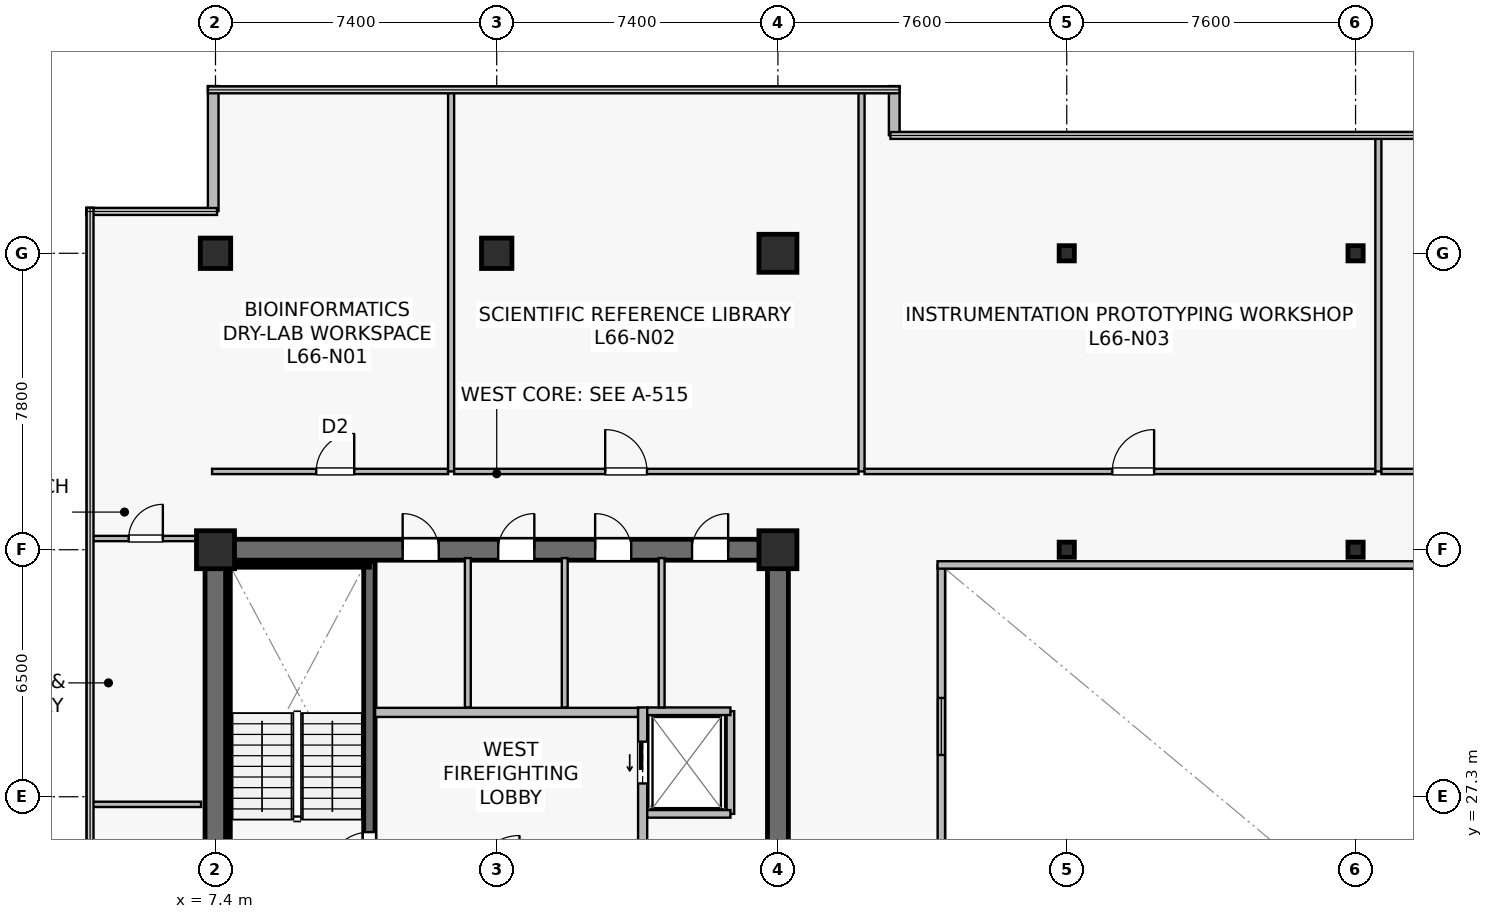
"""IFC4 building model, lengths in metres.
Left out: names, types, materials, properties, quantities, classifications, styles, units other than length and angle.
Written with IfcOpenShell. Run it as: python <this file> out.ifc"""

import sys

from ifc_helpers import new_model, si_unit, direction, frame, frame_2d, origin, origin_2d, place, context, subcontext, project, spatial, rectangle, hollow_rectangle, extrude, source, transform, mapped, element, fill, save


model = new_model("IFC4")
c1 = context("Model", 3, precision=1e-05, world=origin(), true_north=direction((0.0, 1.0)))
c2 = subcontext(c1, "Body", "Model", "MODEL_VIEW")
j1 = project(units=[si_unit("LENGTHUNIT", "METRE"), si_unit("PLANEANGLEUNIT", "RADIAN")], contexts=[c1])
p1 = place(None, origin())
s1 = spatial("IfcSite", under=j1, at=p1, CompositionType="ELEMENT")
p2 = place(p1, origin())
s2 = spatial("IfcBuilding", under=s1, at=p2, CompositionType="ELEMENT")
p3 = place(p2, frame((0.0, 0.0, 275.2)))
s3 = spatial("IfcBuildingStorey", under=s2, at=p3, CompositionType="ELEMENT", Elevation=275.2)
p4 = place(p3, frame((7.125, 33.8, 0.0), z_axis=(0.0, 0.0, 1.0), x_axis=(1.0, 0.0, 0.0)))
e1 = element("IfcWall", 1, at=p4, inside=s3, PredefinedType="SHEAR", context=c2, shape_type="SweptSolid", body=[
    extrude(rectangle(XDim=15.35, YDim=0.55, at=frame_2d((7.675, 0.0))), origin(), (0.0, 0.0, 1.0), 3.8),
])
p5 = place(p4, frame((5.2, 0.0, 0.0)))
e2 = element("IfcOpeningElement", 2, at=p5, cuts=e1, PredefinedType="OPENING", context=c2, shape_type="SweptSolid", body=[
    extrude(rectangle(XDim=0.95, YDim=2.15, at=frame_2d((0.475, 1.075))), frame((0.0, 0.285, 0.0), z_axis=(0.0, -1.0, 0.0), x_axis=(1.0, 0.0, 0.0)), (0.0, 0.0, 1.0), 0.57),
])
p6 = place(p4, frame((7.715, 0.0, 0.0)))
e3 = element("IfcOpeningElement", 3, at=p6, cuts=e1, PredefinedType="OPENING", context=c2, shape_type="SweptSolid", body=[
    extrude(rectangle(XDim=0.95, YDim=2.15, at=frame_2d((0.475, 1.075))), frame((0.0, 0.285, 0.0), z_axis=(0.0, -1.0, 0.0), x_axis=(1.0, 0.0, 0.0)), (0.0, 0.0, 1.0), 0.57),
])
p7 = place(p4, frame((10.265, 0.0, 0.0)))
e4 = element("IfcOpeningElement", 4, at=p7, cuts=e1, PredefinedType="OPENING", context=c2, shape_type="SweptSolid", body=[
    extrude(rectangle(XDim=0.95, YDim=2.15, at=frame_2d((0.475, 1.075))), frame((0.0, 0.285, 0.0), z_axis=(0.0, -1.0, 0.0), x_axis=(1.0, 0.0, 0.0)), (0.0, 0.0, 1.0), 0.57),
])
p8 = place(p4, frame((12.815, 0.0, 0.0)))
e5 = element("IfcOpeningElement", 5, at=p8, cuts=e1, PredefinedType="OPENING", context=c2, shape_type="SweptSolid", body=[
    extrude(rectangle(XDim=0.95, YDim=2.15, at=frame_2d((0.475, 1.075))), frame((0.0, 0.285, 0.0), z_axis=(0.0, -1.0, 0.0), x_axis=(1.0, 0.0, 0.0)), (0.0, 0.0, 1.0), 0.57),
])
p9 = place(p3, frame((7.4, 15.075, 0.0), z_axis=(0.0, 0.0, 1.0), x_axis=(0.0, 1.0, 0.0)))
e6 = element("IfcWall", 6, at=p9, inside=s3, PredefinedType="SHEAR", context=c2, shape_type="SweptSolid", body=[
    extrude(rectangle(XDim=18.45, YDim=0.55, at=frame_2d((9.225, 0.0))), origin(), (0.0, 0.0, 1.0), 3.8),
])
p10 = place(p3, frame((22.2, 15.075, 0.0), z_axis=(0.0, 0.0, 1.0), x_axis=(0.0, 1.0, 0.0)))
e7 = element("IfcWall", 7, at=p10, inside=s3, PredefinedType="SHEAR", context=c2, shape_type="SweptSolid", body=[
    extrude(rectangle(XDim=18.45, YDim=0.55, at=frame_2d((9.225, 0.0))), origin(), (0.0, 0.0, 1.0), 3.8),
])
p11 = place(p10, frame((3.475, 0.0, 0.0)))
e8 = element("IfcOpeningElement", 8, at=p11, cuts=e7, PredefinedType="OPENING", context=c2, shape_type="SweptSolid", body=[
    extrude(rectangle(XDim=1.42, YDim=2.2, at=frame_2d((0.71, 1.1))), frame((0.0, 0.285, 0.0), z_axis=(0.0, -1.0, 0.0), x_axis=(1.0, 0.0, 0.0)), (0.0, 0.0, 1.0), 0.57),
])
p12 = place(p3, frame((11.45, 24.85, 0.0), z_axis=(0.0, 0.0, 1.0), x_axis=(0.0, 1.0, 0.0)))
e9 = element("IfcWall", 9, at=p12, inside=s3, PredefinedType="SHEAR", context=c2, shape_type="SweptSolid", body=[
    extrude(rectangle(XDim=8.63, YDim=0.3, at=frame_2d((4.315, 0.0))), origin(), (0.0, 0.0, 1.0), 3.8),
])
p13 = place(p12, frame((0.42, 0.0, 0.0)))
e10 = element("IfcOpeningElement", 10, at=p13, cuts=e9, PredefinedType="OPENING", context=c2, shape_type="SweptSolid", body=[
    extrude(rectangle(XDim=1.1, YDim=2.15, at=frame_2d((0.55, 1.075))), frame((0.0, 0.16, 0.0), z_axis=(0.0, -1.0, 0.0), x_axis=(1.0, 0.0, 0.0)), (0.0, 0.0, 1.0), 0.32),
])
p14 = place(p3, frame((7.73, 33.4, 0.0), z_axis=(0.0, 0.0, 1.0), x_axis=(1.0, 0.0, 0.0)))
e11 = element("IfcWall", 11, at=p14, inside=s3, PredefinedType="SOLIDWALL", context=c2, shape_type="SweptSolid", body=[
    extrude(rectangle(XDim=3.72, YDim=0.12, at=frame_2d((1.86, 0.0))), origin(), (0.0, 0.0, 1.0), 3.8),
])
p15 = place(p3, frame((7.73, 25.0, 0.0), z_axis=(0.0, 0.0, 1.0), x_axis=(0.0, 1.0, 0.0)))
e12 = element("IfcWall", 12, at=p15, inside=s3, PredefinedType="SOLIDWALL", context=c2, shape_type="SweptSolid", body=[
    extrude(rectangle(XDim=8.32, YDim=0.12, at=frame_2d((4.16, 0.0))), origin(), (0.0, 0.0, 1.0), 3.8),
])
m1 = source(origin(), c2, "Body", "SweptSolid", [
    extrude(rectangle(XDim=1.0, YDim=1.0, at=origin_2d()), origin(), (0.0, 0.0, 1.0), 4.1),
])
for number, where, z_axis, x_axis in (
    (13, (7.4, 33.8, 0.0), (0.0, 0.0, 1.0), (1.0, 0.0, 0.0)),
    (14, (22.2, 33.8, 0.0), (0.0, 0.0, 1.0), (1.0, 0.0, 0.0)),
):
    element("IfcColumn", number, at=place(p3, frame(where, z_axis=z_axis, x_axis=x_axis)), inside=s3, PredefinedType="COLUMN", context=c2, shape_type="MappedRepresentation", body=[
        mapped(m1, transform((0.0, 0.0, 0.0), scale=1.0)),
    ])
m2 = source(origin(), c2, "Body", "SweptSolid", [
    extrude(rectangle(XDim=0.8, YDim=0.8, at=origin_2d()), origin(), (0.0, 0.0, 1.0), 4.1),
])
p16 = place(p3, frame((14.8, 41.6, 0.0), z_axis=(0.0, 0.0, 1.0), x_axis=(1.0, 0.0, 0.0)))
e15 = element("IfcColumn", 15, at=p16, inside=s3, PredefinedType="COLUMN", context=c2, shape_type="MappedRepresentation", body=[
    mapped(m2, transform((0.0, 0.0, 0.0), scale=1.0)),
])
p17 = place(p3, frame((22.2, 41.6, 0.0), z_axis=(0.0, 0.0, 1.0), x_axis=(1.0, 0.0, 0.0)))
e16 = element("IfcColumn", 16, at=p17, inside=s3, PredefinedType="COLUMN", context=c2, shape_type="MappedRepresentation", body=[
    mapped(m1, transform((0.0, 0.0, 0.0), scale=1.0)),
])
p18 = place(p3, frame((7.4, 41.6, 0.0), z_axis=(0.0, 0.0, 1.0), x_axis=(1.0, 0.0, 0.0)))
e17 = element("IfcColumn", 17, at=p18, inside=s3, PredefinedType="COLUMN", context=c2, shape_type="MappedRepresentation", body=[
    mapped(m2, transform((0.0, 0.0, 0.0), scale=1.0)),
])
m3 = source(origin(), c2, "Body", "SweptSolid", [
    extrude(hollow_rectangle(XDim=0.4, YDim=0.4, WallThickness=0.019, at=origin_2d()), origin(), (0.0, 0.0, 1.0), 4.1),
])
for number, where, z_axis, x_axis in (
    (18, (29.8, 33.8, 0.0), (0.0, 0.0, 1.0), (1.0, 0.0, 0.0)),
    (19, (29.8, 41.6, 0.0), (0.0, 0.0, 1.0), (1.0, 0.0, 0.0)),
    (20, (37.4, 33.8, 0.0), (0.0, 0.0, 1.0), (1.0, 0.0, 0.0)),
    (21, (37.4, 41.6, 0.0), (0.0, 0.0, 1.0), (1.0, 0.0, 0.0)),
):
    element("IfcColumn", number, at=place(p3, frame(where, z_axis=z_axis, x_axis=x_axis)), inside=s3, PredefinedType="COLUMN", context=c2, shape_type="MappedRepresentation", body=[
        mapped(m3, transform((0.0, 0.0, 0.0), scale=1.0)),
    ])
p19 = place(p3, frame((25.26, 44.707, 0.0), z_axis=(0.0, 0.0, 1.0), x_axis=(0.0, 1.0, 0.0)))
e22 = element("IfcWall", 22, at=p19, inside=s3, PredefinedType="STANDARD", context=c2, shape_type="SweptSolid", body=[
    extrude(rectangle(XDim=1.293, YDim=0.28, at=frame_2d((0.646, 0.0))), origin(), (0.0, 0.0, 1.0), 3.8),
])
p20 = place(p3, frame((7.34, 46.0, 0.0), z_axis=(0.0, 0.0, 1.0), x_axis=(0.0, -1.0, 0.0)))
e23 = element("IfcWall", 23, at=p20, inside=s3, PredefinedType="STANDARD", context=c2, shape_type="SweptSolid", body=[
    extrude(rectangle(XDim=3.288, YDim=0.28, at=frame_2d((1.644, 0.0))), origin(), (0.0, 0.0, 1.0), 3.8),
])
p21 = place(p3, frame((11.6, 29.52, 0.0), z_axis=(0.0, 0.0, 1.0), x_axis=(1.0, 0.0, 0.0)))
e24 = element("IfcWall", 24, at=p21, inside=s3, PredefinedType="SOLIDWALL", context=c2, shape_type="SweptSolid", body=[
    extrude(rectangle(XDim=6.92, YDim=0.24, at=frame_2d((3.46, 0.0))), origin(), (0.0, 0.0, 1.0), 3.197),
])
p22 = place(p3, frame((18.64, 22.8, 0.0), z_axis=(0.0, 0.0, 1.0), x_axis=(0.0, 1.0, 0.0)))
e25 = element("IfcWall", 25, at=p22, inside=s3, PredefinedType="SOLIDWALL", context=c2, shape_type="SweptSolid", body=[
    extrude(rectangle(XDim=6.85, YDim=0.24, at=frame_2d((3.425, 0.0))), origin(), (0.0, 0.0, 1.0), 2.935),
])
p23 = place(p22, frame((4.85, 0.0, 0.0)))
e26 = element("IfcOpeningElement", 26, at=p23, cuts=e25, PredefinedType="OPENING", context=c2, shape_type="SweptSolid", body=[
    extrude(rectangle(XDim=1.1, YDim=2.22, at=frame_2d((0.55, 1.11))), frame((0.0, 0.13, 0.0), z_axis=(0.0, -1.0, 0.0), x_axis=(1.0, 0.0, 0.0)), (0.0, 0.0, 1.0), 0.26),
])
p24 = place(p22, frame((1.0, 0.0, 0.0)))
e27 = element("IfcOpeningElement", 27, at=p24, cuts=e25, PredefinedType="OPENING", context=c2, shape_type="SweptSolid", body=[
    extrude(rectangle(XDim=1.2, YDim=2.22, at=frame_2d((0.6, 1.11))), frame((0.0, 0.13, 0.0), z_axis=(0.0, -1.0, 0.0), x_axis=(1.0, 0.0, 0.0)), (0.0, 0.0, 1.0), 0.26),
])
p25 = place(p3, frame((20.95, 26.85, 0.0), z_axis=(0.0, 0.0, 1.0), x_axis=(0.0, 1.0, 0.0)))
e28 = element("IfcWall", 28, at=p25, inside=s3, PredefinedType="SOLIDWALL", context=c2, shape_type="SweptSolid", body=[
    extrude(rectangle(XDim=2.7, YDim=0.2, at=frame_2d((1.35, 0.0))), origin(), (0.0, 0.0, 1.0), 3.8),
])
p26 = place(p3, frame((18.76, 29.55, 0.0), z_axis=(0.0, 0.0, 1.0), x_axis=(1.0, 0.0, 0.0)))
e29 = element("IfcWall", 29, at=p26, inside=s3, PredefinedType="SOLIDWALL", context=c2, shape_type="SweptSolid", body=[
    extrude(rectangle(XDim=2.19, YDim=0.2, at=frame_2d((1.095, 0.0))), origin(), (0.0, 0.0, 1.0), 3.8),
])
p27 = place(p3, frame((18.76, 26.85, 0.0), z_axis=(0.0, 0.0, 1.0), x_axis=(1.0, 0.0, 0.0)))
e30 = element("IfcWall", 30, at=p27, inside=s3, PredefinedType="SOLIDWALL", context=c2, shape_type="SweptSolid", body=[
    extrude(rectangle(XDim=2.19, YDim=0.2, at=frame_2d((1.095, 0.0))), origin(), (0.0, 0.0, 1.0), 3.197),
])
for number, where, z_axis, x_axis in (
    (31, (14.04, 29.65, 0.0), (0.0, 0.0, 1.0), (0.0, 1.0, 0.0)),
    (32, (16.59, 29.65, 0.0), (0.0, 0.0, 1.0), (0.0, 1.0, 0.0)),
    (33, (19.14, 29.65, 0.0), (0.0, 0.0, 1.0), (0.0, 1.0, 0.0)),
):
    element("IfcWall", number, at=place(p3, frame(where, z_axis=z_axis, x_axis=x_axis)), inside=s3, PredefinedType="PLUMBINGWALL", context=c2, shape_type="SweptSolid", body=[
        extrude(rectangle(XDim=3.93, YDim=0.155, at=frame_2d((1.965, 0.0))), origin(), (0.0, 0.0, 1.0), 3.8),
    ])
p28 = place(p3, frame((26.5, 15.2, 0.0), z_axis=(0.0, 0.0, 1.0), x_axis=(0.0, 1.0, 0.0)))
e34 = element("IfcWall", 34, at=p28, inside=s3, PredefinedType="SOLIDWALL", context=c2, shape_type="SweptSolid", body=[
    extrude(rectangle(XDim=18.2, YDim=0.195, at=frame_2d((9.1, 0.0))), origin(), (0.0, 0.0, 1.0), 3.8),
])
p29 = place(p28, frame((1.8, 0.0, 0.9)))
e35 = element("IfcOpeningElement", 35, at=p29, cuts=e34, PredefinedType="OPENING", context=c2, shape_type="SweptSolid", body=[
    extrude(rectangle(XDim=1.5, YDim=1.4, at=frame_2d((0.75, 0.7))), frame((0.0, 0.107, 0.0), z_axis=(0.0, -1.0, 0.0), x_axis=(1.0, 0.0, 0.0)), (0.0, 0.0, 1.0), 0.215),
])
p30 = place(p28, frame((13.2, 0.0, 0.9)))
e36 = element("IfcOpeningElement", 36, at=p30, cuts=e34, PredefinedType="OPENING", context=c2, shape_type="SweptSolid", body=[
    extrude(rectangle(XDim=1.5, YDim=1.4, at=frame_2d((0.75, 0.7))), frame((0.0, 0.107, 0.0), z_axis=(0.0, -1.0, 0.0), x_axis=(1.0, 0.0, 0.0)), (0.0, 0.0, 1.0), 0.215),
])
p31 = place(p3, frame((26.4, 33.4, 0.0), z_axis=(0.0, 0.0, 1.0), x_axis=(1.0, 0.0, 0.0)))
e37 = element("IfcWall", 37, at=p31, inside=s3, PredefinedType="SOLIDWALL", context=c2, shape_type="SweptSolid", body=[
    extrude(rectangle(XDim=22.0, YDim=0.195, at=frame_2d((11.0, 0.0))), origin(), (0.0, 0.0, 1.0), 3.8),
])
p32 = place(p3, frame((7.31, 35.86, 0.0), z_axis=(0.0, 0.0, 1.0), x_axis=(1.0, 0.0, 0.0)))
e38 = element("IfcWall", 38, at=p32, inside=s3, PredefinedType="PARTITIONING", context=c2, shape_type="SweptSolid", body=[
    extrude(rectangle(XDim=6.21, YDim=0.14, at=frame_2d((3.105, 0.0))), origin(), (0.0, 0.0, 1.0), 3.335),
])
p33 = place(p32, frame((2.74, 0.0, 0.0)))
e39 = element("IfcOpeningElement", 39, at=p33, cuts=e38, PredefinedType="OPENING", context=c2, shape_type="SweptSolid", body=[
    extrude(rectangle(XDim=1.0, YDim=2.15, at=frame_2d((0.5, 1.075))), frame((0.0, 0.08, 0.0), z_axis=(0.0, -1.0, 0.0), x_axis=(1.0, 0.0, 0.0)), (0.0, 0.0, 1.0), 0.16),
])
p34 = place(p3, frame((13.6, 35.86, 0.0), z_axis=(0.0, 0.0, 1.0), x_axis=(0.0, 1.0, 0.0)))
e40 = element("IfcWall", 40, at=p34, inside=s3, PredefinedType="PARTITIONING", context=c2, shape_type="SweptSolid", body=[
    extrude(rectangle(XDim=10.03, YDim=0.16, at=frame_2d((5.015, 0.0))), origin(), (0.0, 0.0, 1.0), 3.135),
])
p35 = place(p3, frame((13.68, 35.86, 0.0), z_axis=(0.0, 0.0, 1.0), x_axis=(1.0, 0.0, 0.0)))
e41 = element("IfcWall", 41, at=p35, inside=s3, PredefinedType="PARTITIONING", context=c2, shape_type="SweptSolid", body=[
    extrude(rectangle(XDim=10.64, YDim=0.14, at=frame_2d((5.32, 0.0))), origin(), (0.0, 0.0, 1.0), 3.197),
])
p36 = place(p35, frame((3.974, 0.0, 0.0)))
e42 = element("IfcOpeningElement", 42, at=p36, cuts=e41, PredefinedType="OPENING", context=c2, shape_type="SweptSolid", body=[
    extrude(rectangle(XDim=1.1, YDim=2.18, at=frame_2d((0.55, 1.09))), frame((0.0, 0.08, 0.0), z_axis=(0.0, -1.0, 0.0), x_axis=(1.0, 0.0, 0.0)), (0.0, 0.0, 1.0), 0.16),
])
p37 = place(p3, frame((24.4, 35.86, 0.0), z_axis=(0.0, 0.0, 1.0), x_axis=(0.0, 1.0, 0.0)))
e43 = element("IfcWall", 43, at=p37, inside=s3, PredefinedType="PARTITIONING", context=c2, shape_type="SweptSolid", body=[
    extrude(rectangle(XDim=10.03, YDim=0.16, at=frame_2d((5.015, 0.0))), origin(), (0.0, 0.0, 1.0), 3.135),
])
p38 = place(p3, frame((24.48, 35.86, 0.0), z_axis=(0.0, 0.0, 1.0), x_axis=(1.0, 0.0, 0.0)))
e44 = element("IfcWall", 44, at=p38, inside=s3, PredefinedType="PARTITIONING", context=c2, shape_type="SweptSolid", body=[
    extrude(rectangle(XDim=13.44, YDim=0.14, at=frame_2d((6.72, 0.0))), origin(), (0.0, 0.0, 1.0), 3.197),
])
p39 = place(p38, frame((6.519, 0.0, 0.0)))
e45 = element("IfcOpeningElement", 45, at=p39, cuts=e44, PredefinedType="OPENING", context=c2, shape_type="SweptSolid", body=[
    extrude(rectangle(XDim=1.1, YDim=2.18, at=frame_2d((0.55, 1.09))), frame((0.0, 0.08, 0.0), z_axis=(0.0, -1.0, 0.0), x_axis=(1.0, 0.0, 0.0)), (0.0, 0.0, 1.0), 0.16),
])
p40 = place(p3, frame((38.0, 35.86, 0.0), z_axis=(0.0, 0.0, 1.0), x_axis=(0.0, 1.0, 0.0)))
e46 = element("IfcWall", 46, at=p40, inside=s3, PredefinedType="PARTITIONING", context=c2, shape_type="SweptSolid", body=[
    extrude(rectangle(XDim=8.83, YDim=0.16, at=frame_2d((4.415, 0.0))), origin(), (0.0, 0.0, 1.0), 3.135),
])
p41 = place(p3, frame((38.08, 35.86, 0.0), z_axis=(0.0, 0.0, 1.0), x_axis=(1.0, 0.0, 0.0)))
e47 = element("IfcWall", 47, at=p41, inside=s3, PredefinedType="PARTITIONING", context=c2, shape_type="SweptSolid", body=[
    extrude(rectangle(XDim=14.84, YDim=0.14, at=frame_2d((7.42, 0.0))), origin(), (0.0, 0.0, 1.0), 3.197),
])
p42 = place(p41, frame((5.696, 0.0, 0.0)))
e48 = element("IfcOpeningElement", 48, at=p42, cuts=e47, PredefinedType="OPENING", context=c2, shape_type="SweptSolid", body=[
    extrude(rectangle(XDim=1.1, YDim=2.18, at=frame_2d((0.55, 1.09))), frame((0.0, 0.08, 0.0), z_axis=(0.0, -1.0, 0.0), x_axis=(1.0, 0.0, 0.0)), (0.0, 0.0, 1.0), 0.16),
])
p43 = place(p3, frame((4.11, 27.1, 0.0), z_axis=(0.0, 0.0, 1.0), x_axis=(1.0, 0.0, 0.0)))
e49 = element("IfcWall", 49, at=p43, inside=s3, PredefinedType="PARTITIONING", context=c2, shape_type="SweptSolid", body=[
    extrude(rectangle(XDim=2.91, YDim=0.14, at=frame_2d((1.455, 0.0))), origin(), (0.0, 0.0, 1.0), 3.8),
])
p44 = place(p3, frame((4.11, 34.095, 0.0), z_axis=(0.0, 0.0, 1.0), x_axis=(1.0, 0.0, 0.0)))
e50 = element("IfcWall", 50, at=p44, inside=s3, PredefinedType="PARTITIONING", context=c2, shape_type="SweptSolid", body=[
    extrude(rectangle(XDim=2.91, YDim=0.14, at=frame_2d((1.455, 0.0))), origin(), (0.0, 0.0, 1.0), 3.8),
])
p45 = place(p44, frame((1.005, 0.0, 0.0)))
e51 = element("IfcOpeningElement", 51, at=p45, cuts=e50, PredefinedType="OPENING", context=c2, shape_type="SweptSolid", body=[
    extrude(rectangle(XDim=0.9, YDim=2.1, at=frame_2d((0.45, 1.05))), frame((0.0, 0.08, 0.0), z_axis=(0.0, -1.0, 0.0), x_axis=(1.0, 0.0, 0.0)), (0.0, 0.0, 1.0), 0.16),
])
m4 = source(origin(), c2, "Body", "SweptSolid", [
    extrude(rectangle(XDim=1.5, YDim=1.4, at=frame_2d((0.75, 0.7))), frame((0.0, 0.03, 0.0), z_axis=(0.0, -1.0, 0.0), x_axis=(1.0, 0.0, 0.0)), (0.0, 0.0, 1.0), 0.06),
])
p46 = place(p30, origin())
e52 = element("IfcWindow", 52, at=p46, inside=s3, PartitioningType="SINGLE_PANEL", PredefinedType="WINDOW", context=c2, shape_type="MappedRepresentation", body=[
    mapped(m4, transform((0.0, 0.0, 0.0), scale=1.0)),
])
fill(e36, e52)
m5 = source(origin(), c2, "Body", "SweptSolid", [
    extrude(rectangle(XDim=1.1, YDim=2.15, at=frame_2d((0.55, 1.075))), frame((0.0, 0.025, 0.0), z_axis=(0.0, -1.0, 0.0), x_axis=(1.0, 0.0, 0.0)), (0.0, 0.0, 1.0), 0.05),
])
p47 = place(p13, origin())
e53 = element("IfcDoor", 53, at=p47, inside=s3, OperationType="SINGLE_SWING_LEFT", PredefinedType="DOOR", context=c2, shape_type="MappedRepresentation", body=[
    mapped(m5, transform((0.0, 0.0, 0.0), scale=1.0)),
])
fill(e10, e53)
m6 = source(origin(), c2, "Body", "SweptSolid", [
    extrude(rectangle(XDim=1.1, YDim=2.22, at=frame_2d((0.55, 1.11))), frame((0.0, 0.025, 0.0), z_axis=(0.0, -1.0, 0.0), x_axis=(1.0, 0.0, 0.0)), (0.0, 0.0, 1.0), 0.05),
])
p48 = place(p23, origin())
e54 = element("IfcDoor", 54, at=p48, inside=s3, OperationType="SLIDING_TO_LEFT", PredefinedType="USERDEFINED", context=c2, shape_type="MappedRepresentation", body=[
    mapped(m6, transform((0.0, 0.0, 0.0), scale=1.0)),
])
fill(e26, e54)
m7 = source(origin(), c2, "Body", "SweptSolid", [
    extrude(rectangle(XDim=0.95, YDim=2.15, at=frame_2d((0.475, 1.075))), frame((0.0, 0.025, 0.0), z_axis=(0.0, -1.0, 0.0), x_axis=(1.0, 0.0, 0.0)), (0.0, 0.0, 1.0), 0.05),
])
p49 = place(p5, origin())
e55 = element("IfcDoor", 55, at=p49, inside=s3, OperationType="SINGLE_SWING_LEFT", PredefinedType="DOOR", context=c2, shape_type="MappedRepresentation", body=[
    mapped(m7, transform((0.0, 0.0, 0.0), scale=1.0)),
])
fill(e2, e55)
p50 = place(p6, origin())
e56 = element("IfcDoor", 56, at=p50, inside=s3, OperationType="SINGLE_SWING_RIGHT", PredefinedType="DOOR", context=c2, shape_type="MappedRepresentation", body=[
    mapped(m7, transform((0.0, 0.0, 0.0), scale=1.0)),
])
fill(e3, e56)
p51 = place(p7, origin())
e57 = element("IfcDoor", 57, at=p51, inside=s3, OperationType="SINGLE_SWING_LEFT", PredefinedType="DOOR", context=c2, shape_type="MappedRepresentation", body=[
    mapped(m7, transform((0.0, 0.0, 0.0), scale=1.0)),
])
fill(e4, e57)
p52 = place(p8, origin())
e58 = element("IfcDoor", 58, at=p52, inside=s3, OperationType="SINGLE_SWING_RIGHT", PredefinedType="DOOR", context=c2, shape_type="MappedRepresentation", body=[
    mapped(m7, transform((0.0, 0.0, 0.0), scale=1.0)),
])
fill(e5, e58)
m8 = source(origin(), c2, "Body", "SweptSolid", [
    extrude(rectangle(XDim=1.0, YDim=2.15, at=frame_2d((0.5, 1.075))), frame((0.0, 0.025, 0.0), z_axis=(0.0, -1.0, 0.0), x_axis=(1.0, 0.0, 0.0)), (0.0, 0.0, 1.0), 0.05),
])
p53 = place(p33, origin())
e59 = element("IfcDoor", 59, at=p53, inside=s3, OperationType="SINGLE_SWING_RIGHT", PredefinedType="DOOR", context=c2, shape_type="MappedRepresentation", body=[
    mapped(m8, transform((0.0, 0.0, 0.0), scale=1.0)),
])
fill(e39, e59)
m9 = source(origin(), c2, "Body", "SweptSolid", [
    extrude(rectangle(XDim=1.1, YDim=2.18, at=frame_2d((0.55, 1.09))), frame((0.0, 0.025, 0.0), z_axis=(0.0, -1.0, 0.0), x_axis=(1.0, 0.0, 0.0)), (0.0, 0.0, 1.0), 0.05),
])
p54 = place(p36, origin())
e60 = element("IfcDoor", 60, at=p54, inside=s3, OperationType="SINGLE_SWING_LEFT", PredefinedType="DOOR", context=c2, shape_type="MappedRepresentation", body=[
    mapped(m9, transform((0.0, 0.0, 0.0), scale=1.0)),
])
fill(e42, e60)
p55 = place(p39, origin())
e61 = element("IfcDoor", 61, at=p55, inside=s3, OperationType="SINGLE_SWING_RIGHT", PredefinedType="DOOR", context=c2, shape_type="MappedRepresentation", body=[
    mapped(m9, transform((0.0, 0.0, 0.0), scale=1.0)),
])
fill(e45, e61)
m10 = source(origin(), c2, "Body", "SweptSolid", [
    extrude(rectangle(XDim=0.9, YDim=2.1, at=frame_2d((0.45, 1.05))), frame((0.0, 0.025, 0.0), z_axis=(0.0, -1.0, 0.0), x_axis=(1.0, 0.0, 0.0)), (0.0, 0.0, 1.0), 0.05),
])
p56 = place(p45, origin())
e62 = element("IfcDoor", 62, at=p56, inside=s3, OperationType="SINGLE_SWING_RIGHT", PredefinedType="DOOR", context=c2, shape_type="MappedRepresentation", body=[
    mapped(m10, transform((0.0, 0.0, 0.0), scale=1.0)),
])
fill(e51, e62)
save(model, sys.argv[1])
